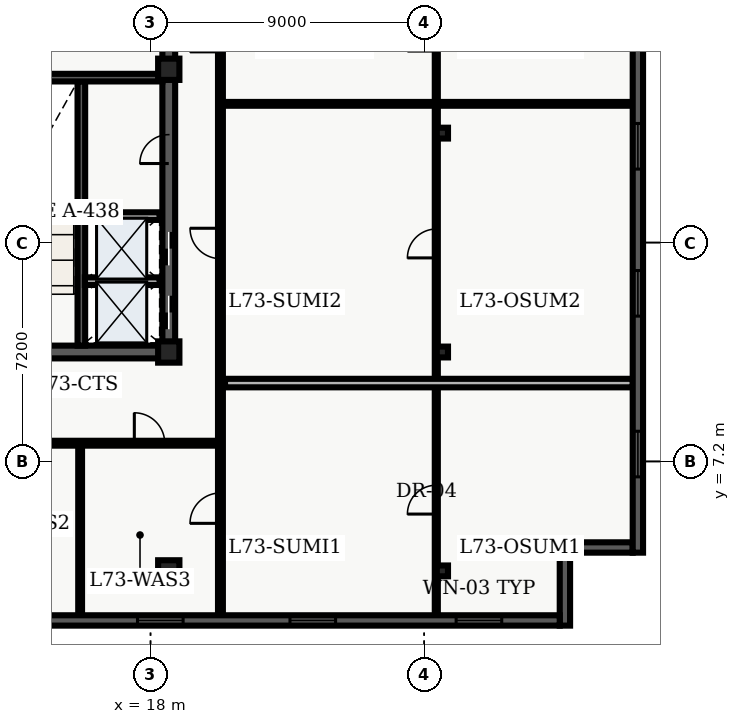
"""IFC4 building model, lengths in metres.
Left out: names, types, materials, properties, quantities, classifications, styles, units other than length and angle.
Written with IfcOpenShell. Run it as: python <this file> out.ifc"""

import sys

from ifc_helpers import new_model, entity, si_unit, converted_unit, direction, frame, origin_with_axes, origin_2d_with_axis, place, context, subcontext, project, spatial, polyline, rectangle, i_section, outline, extrude, element, fill, save


model = new_model("IFC4")
c1 = context("Model", 3, precision=1e-05, world=origin_with_axes(), true_north=direction((0.0, 1.0)))
c2 = subcontext(c1, "Body", "Model", "MODEL_VIEW")
j1 = project(units=[si_unit("LENGTHUNIT", "METRE"), converted_unit("PLANEANGLEUNIT", "DEGREE", entity("IfcPlaneAngleMeasure", 0.017), si_unit("PLANEANGLEUNIT", "RADIAN"), dimensions=[0, 0, 0, 0, 0, 0, 0])], contexts=[c1])
p1 = place(None, origin_with_axes())
s1 = spatial("IfcSite", under=j1, at=p1, CompositionType="ELEMENT")
p2 = place(p1, origin_with_axes())
s2 = spatial("IfcBuilding", under=s1, at=p2, CompositionType="ELEMENT")
p3 = place(p2, frame((0.0, 0.0, 295.8), z_axis=(0.0, 0.0, 1.0), x_axis=(1.0, 0.0, 0.0)))
s3 = spatial("IfcBuildingStorey", under=s2, at=p3, CompositionType="ELEMENT", Elevation=295.8)
p4 = place(p3, frame((11.4, 10.8, 0.0), z_axis=(0.0, 0.0, 1.0), x_axis=(1.0, 0.0, 0.0)))
e1 = element("IfcWall", 1, at=p4, inside=s3, PredefinedType="SHEAR", context=c2, shape_type="SweptSolid", body=[
    extrude(outline(polyline([(0.0, -0.21), (7.2, -0.21), (7.2, 0.21), (0.0, 0.21), (0.0, -0.21)])), origin_with_axes(), (0.0, 0.0, 1.0), 3.66),
])
p5 = place(p4, frame((2.625, 0.0, 0.0), z_axis=(0.0, 0.0, 1.0), x_axis=(1.0, 0.0, 0.0)))
e2 = element("IfcOpeningElement", 2, at=p5, cuts=e1, PredefinedType="OPENING", context=c2, shape_type="SweptSolid", body=[
    extrude(rectangle(XDim=1.05, YDim=0.44, at=origin_2d_with_axis()), origin_with_axes(), (0.0, 0.0, 1.0), 2.15),
])
p6 = place(p3, frame((18.6, 10.8, 0.0), z_axis=(0.0, 0.0, 1.0), x_axis=(0.0, 1.0, 0.0)))
e3 = element("IfcWall", 3, at=p6, inside=s3, PredefinedType="SHEAR", context=c2, shape_type="SweptSolid", body=[
    extrude(outline(polyline([(0.0, -0.21), (13.5, -0.21), (13.5, 0.21), (0.0, 0.21), (0.0, -0.21)])), origin_with_axes(), (0.0, 0.0, 1.0), 3.66),
])
p7 = place(p6, frame((1.3, 0.0, 0.0), z_axis=(0.0, 0.0, 1.0), x_axis=(1.0, 0.0, 0.0)))
e4 = element("IfcOpeningElement", 4, at=p7, cuts=e3, PredefinedType="OPENING", context=c2, shape_type="SweptSolid", body=[
    extrude(rectangle(XDim=1.1, YDim=0.44, at=origin_2d_with_axis()), origin_with_axes(), (0.0, 0.0, 1.0), 2.15),
])
p8 = place(p6, frame((3.4, 0.0, 0.0), z_axis=(0.0, 0.0, 1.0), x_axis=(1.0, 0.0, 0.0)))
e5 = element("IfcOpeningElement", 5, at=p8, cuts=e3, PredefinedType="OPENING", context=c2, shape_type="SweptSolid", body=[
    extrude(rectangle(XDim=1.1, YDim=0.44, at=origin_2d_with_axis()), origin_with_axes(), (0.0, 0.0, 1.0), 2.15),
])
p9 = place(p6, frame((11.125, 0.0, 0.0), z_axis=(0.0, 0.0, 1.0), x_axis=(1.0, 0.0, 0.0)))
e6 = element("IfcOpeningElement", 6, at=p9, cuts=e3, PredefinedType="OPENING", context=c2, shape_type="SweptSolid", body=[
    extrude(rectangle(XDim=1.05, YDim=0.44, at=origin_2d_with_axis()), origin_with_axes(), (0.0, 0.0, 1.0), 2.15),
])
p10 = place(p6, frame((6.675, 0.0, 0.0), z_axis=(0.0, 0.0, 1.0), x_axis=(1.0, 0.0, 0.0)))
e7 = element("IfcOpeningElement", 7, at=p10, cuts=e3, PredefinedType="OPENING", context=c2, shape_type="SweptSolid", body=[
    extrude(rectangle(XDim=0.95, YDim=0.44, at=origin_2d_with_axis()), origin_with_axes(), (0.0, 0.0, 1.0), 2.15),
])
p11 = place(p3, frame((15.725, 11.01, 0.0), z_axis=(0.0, 0.0, 1.0), x_axis=(0.0, 1.0, 0.0)))
e8 = element("IfcWall", 8, at=p11, inside=s3, PredefinedType="SHEAR", context=c2, shape_type="SweptSolid", body=[
    extrude(outline(polyline([(0.0, -0.125), (8.69, -0.125), (8.69, 0.125), (0.0, 0.125), (0.0, -0.125)])), origin_with_axes(), (0.0, 0.0, 1.0), 3.66),
])
p12 = place(p3, frame((11.61, 19.825, 0.0), z_axis=(0.0, 0.0, 1.0), x_axis=(1.0, 0.0, 0.0)))
e9 = element("IfcWall", 9, at=p12, inside=s3, PredefinedType="SHEAR", context=c2, shape_type="SweptSolid", body=[
    extrude(outline(polyline([(0.0, -0.125), (6.78, -0.125), (6.78, 0.125), (0.0, 0.125), (0.0, -0.125)])), origin_with_axes(), (0.0, 0.0, 1.0), 3.66),
])
for number, where, z_axis, x_axis in (
    (10, (18.6, 3.6, 0.0), (0.0, 0.0, 1.0), (1.0, 0.0, 0.0)),
    (11, (18.6, 10.8, 0.0), (0.0, 0.0, 1.0), (1.0, 0.0, 0.0)),
    (12, (18.6, 20.1, 0.0), (0.0, 0.0, 1.0), (1.0, 0.0, 0.0)),
):
    element("IfcColumn", number, at=place(p3, frame(where, z_axis=z_axis, x_axis=x_axis)), inside=s3, PredefinedType="COLUMN", context=c2, shape_type="SweptSolid", body=[
        extrude(rectangle(XDim=0.7, YDim=0.7, at=origin_2d_with_axis()), origin_with_axes(), (0.0, 0.0, 1.0), 3.9),
    ])
for number, where, z_axis, x_axis in (
    (13, (27.6, 3.6, 0.0), (0.0, 0.0, 1.0), (1.0, 0.0, 0.0)),
    (14, (27.6, 10.8, 0.0), (0.0, 0.0, 1.0), (1.0, 0.0, 0.0)),
    (15, (27.6, 18.0, 0.0), (0.0, 0.0, 1.0), (1.0, 0.0, 0.0)),
):
    element("IfcColumn", number, at=place(p3, frame(where, z_axis=z_axis, x_axis=x_axis)), inside=s3, PredefinedType="COLUMN", context=c2, shape_type="SweptSolid", body=[
        extrude(i_section(OverallWidth=0.369, OverallDepth=0.356, WebThickness=0.011, FlangeThickness=0.018, FilletRadius=0.018, at=origin_2d_with_axis()), origin_with_axes(), (0.0, 0.0, 1.0), 3.9),
    ])
for number, where, z_axis, x_axis in (
    (16, (15.84, 13.13, 0.0), (0.0, 0.0, 1.0), (1.0, 0.0, 0.0)),
    (17, (15.84, 15.27, 0.0), (0.0, 0.0, 1.0), (1.0, 0.0, 0.0)),
):
    element("IfcWall", number, at=place(p3, frame(where, z_axis=z_axis, x_axis=x_axis)), inside=s3, PredefinedType="SOLIDWALL", context=c2, shape_type="SweptSolid", body=[
        extrude(outline(polyline([(0.0, -0.125), (2.46, -0.125), (2.46, 0.125), (0.0, 0.125), (0.0, -0.125)])), origin_with_axes(), (0.0, 0.0, 1.0), 2.7),
    ])
p13 = place(p3, frame((8.135, 7.8, 0.0), z_axis=(0.0, 0.0, 1.0), x_axis=(1.0, 0.0, 0.0)))
e18 = element("IfcWall", 18, at=p13, inside=s3, PredefinedType="PARTITIONING", context=c2, shape_type="SweptSolid", body=[
    extrude(outline(polyline([(0.0, -0.08), (12.165, -0.08), (12.165, 0.08), (0.0, 0.08), (0.0, -0.08)])), origin_with_axes(), (0.0, 0.0, 1.0), 2.7),
])
p14 = place(p13, frame((0.908, 0.0, 0.0), z_axis=(0.0, 0.0, 1.0), x_axis=(1.0, 0.0, 0.0)))
e19 = element("IfcOpeningElement", 19, at=p14, cuts=e18, PredefinedType="OPENING", context=c2, shape_type="SweptSolid", body=[
    extrude(rectangle(XDim=1.0, YDim=0.18, at=origin_2d_with_axis()), origin_with_axes(), (0.0, 0.0, 1.0), 2.15),
])
p15 = place(p13, frame((5.556, 0.0, 0.0), z_axis=(0.0, 0.0, 1.0), x_axis=(1.0, 0.0, 0.0)))
e20 = element("IfcOpeningElement", 20, at=p15, cuts=e18, PredefinedType="OPENING", context=c2, shape_type="SweptSolid", body=[
    extrude(rectangle(XDim=1.0, YDim=0.18, at=origin_2d_with_axis()), origin_with_axes(), (0.0, 0.0, 1.0), 2.15),
])
p16 = place(p13, frame((9.832, 0.0, 0.0), z_axis=(0.0, 0.0, 1.0), x_axis=(1.0, 0.0, 0.0)))
e21 = element("IfcOpeningElement", 21, at=p16, cuts=e18, PredefinedType="OPENING", context=c2, shape_type="SweptSolid", body=[
    extrude(rectangle(XDim=1.0, YDim=0.18, at=origin_2d_with_axis()), origin_with_axes(), (0.0, 0.0, 1.0), 2.15),
])
p17 = place(p3, frame((20.3, 2.14, 0.0), z_axis=(0.0, 0.0, 1.0), x_axis=(0.0, 1.0, 0.0)))
e22 = element("IfcWall", 22, at=p17, inside=s3, PredefinedType="PARTITIONING", context=c2, shape_type="SweptSolid", body=[
    extrude(outline(polyline([(0.0, -0.08), (38.36, -0.08), (38.36, 0.08), (0.0, 0.08), (0.0, -0.08)])), origin_with_axes(), (0.0, 0.0, 1.0), 2.7),
])
p18 = place(p17, frame((30.685, 0.0, 0.0), z_axis=(0.0, 0.0, 1.0), x_axis=(1.0, 0.0, 0.0)))
e23 = element("IfcOpeningElement", 23, at=p18, cuts=e22, PredefinedType="OPENING", context=c2, shape_type="SweptSolid", body=[
    extrude(rectangle(XDim=1.05, YDim=0.18, at=origin_2d_with_axis()), origin_with_axes(), (0.0, 0.0, 1.0), 2.15),
])
p19 = place(p17, frame((3.524, 0.0, 0.0), z_axis=(0.0, 0.0, 1.0), x_axis=(1.0, 0.0, 0.0)))
e24 = element("IfcOpeningElement", 24, at=p19, cuts=e22, PredefinedType="OPENING", context=c2, shape_type="SweptSolid", body=[
    extrude(rectangle(XDim=1.0, YDim=0.18, at=origin_2d_with_axis()), origin_with_axes(), (0.0, 0.0, 1.0), 2.15),
])
p20 = place(p17, frame((12.23, 0.0, 0.0), z_axis=(0.0, 0.0, 1.0), x_axis=(1.0, 0.0, 0.0)))
e25 = element("IfcOpeningElement", 25, at=p20, cuts=e22, PredefinedType="OPENING", context=c2, shape_type="SweptSolid", body=[
    extrude(rectangle(XDim=1.0, YDim=0.18, at=origin_2d_with_axis()), origin_with_axes(), (0.0, 0.0, 1.0), 2.15),
])
p21 = place(p17, frame((19.033, 0.0, 0.0), z_axis=(0.0, 0.0, 1.0), x_axis=(1.0, 0.0, 0.0)))
e26 = element("IfcOpeningElement", 26, at=p21, cuts=e22, PredefinedType="OPENING", context=c2, shape_type="SweptSolid", body=[
    extrude(rectangle(XDim=1.0, YDim=0.18, at=origin_2d_with_axis()), origin_with_axes(), (0.0, 0.0, 1.0), 2.15),
])
p22 = place(p17, frame((23.912, 0.0, 0.0), z_axis=(0.0, 0.0, 1.0), x_axis=(1.0, 0.0, 0.0)))
e27 = element("IfcOpeningElement", 27, at=p22, cuts=e22, PredefinedType="OPENING", context=c2, shape_type="SweptSolid", body=[
    extrude(rectangle(XDim=1.0, YDim=0.18, at=origin_2d_with_axis()), origin_with_axes(), (0.0, 0.0, 1.0), 2.15),
])
p23 = place(p3, frame((15.685, 2.135, 0.0), z_axis=(0.0, 0.0, 1.0), x_axis=(0.0, 1.0, 0.0)))
e28 = element("IfcWall", 28, at=p23, inside=s3, PredefinedType="PARTITIONING", context=c2, shape_type="SweptSolid", body=[
    extrude(outline(polyline([(0.0, -0.062), (5.565, -0.062), (5.565, 0.062), (0.0, 0.062), (0.0, -0.062)])), origin_with_axes(), (0.0, 0.0, 1.0), 2.7),
])
p24 = place(p3, frame((27.4, 2.135, 0.0), z_axis=(0.0, 0.0, 1.0), x_axis=(0.0, 1.0, 0.0)))
e29 = element("IfcWall", 29, at=p24, inside=s3, PredefinedType="PARTITIONING", context=c2, shape_type="SweptSolid", body=[
    extrude(outline(polyline([(0.0, -0.05), (26.515, -0.05), (26.515, 0.05), (0.0, 0.05), (0.0, -0.05)])), origin_with_axes(), (0.0, 0.0, 1.0), 2.7),
])
p25 = place(p24, frame((3.809, 0.0, 0.0), z_axis=(0.0, 0.0, 1.0), x_axis=(1.0, 0.0, 0.0)))
e30 = element("IfcOpeningElement", 30, at=p25, cuts=e29, PredefinedType="OPENING", context=c2, shape_type="SweptSolid", body=[
    extrude(rectangle(XDim=0.95, YDim=0.12, at=origin_2d_with_axis()), origin_with_axes(), (0.0, 0.0, 1.0), 2.15),
])
p26 = place(p24, frame((12.236, 0.0, 0.0), z_axis=(0.0, 0.0, 1.0), x_axis=(1.0, 0.0, 0.0)))
e31 = element("IfcOpeningElement", 31, at=p26, cuts=e29, PredefinedType="OPENING", context=c2, shape_type="SweptSolid", body=[
    extrude(rectangle(XDim=0.95, YDim=0.12, at=origin_2d_with_axis()), origin_with_axes(), (0.0, 0.0, 1.0), 2.15),
])
p27 = place(p24, frame((19.038, 0.0, 0.0), z_axis=(0.0, 0.0, 1.0), x_axis=(1.0, 0.0, 0.0)))
e32 = element("IfcOpeningElement", 32, at=p27, cuts=e29, PredefinedType="OPENING", context=c2, shape_type="SweptSolid", body=[
    extrude(rectangle(XDim=0.95, YDim=0.12, at=origin_2d_with_axis()), origin_with_axes(), (0.0, 0.0, 1.0), 2.15),
])
p28 = place(p24, frame((23.916, 0.0, 0.0), z_axis=(0.0, 0.0, 1.0), x_axis=(1.0, 0.0, 0.0)))
e33 = element("IfcOpeningElement", 33, at=p28, cuts=e29, PredefinedType="OPENING", context=c2, shape_type="SweptSolid", body=[
    extrude(rectangle(XDim=0.95, YDim=0.12, at=origin_2d_with_axis()), origin_with_axes(), (0.0, 0.0, 1.0), 2.15),
])
p29 = place(p3, frame((20.45, 9.778, 0.0), z_axis=(0.0, 0.0, 1.0), x_axis=(1.0, 0.0, 0.0)))
e34 = element("IfcWall", 34, at=p29, inside=s3, PredefinedType="PARTITIONING", context=c2, shape_type="SweptSolid", body=[
    extrude(outline(polyline([(0.0, -0.14), (13.415, -0.14), (13.415, 0.14), (0.0, 0.14), (0.0, -0.14)])), origin_with_axes(), (0.0, 0.0, 1.0), 2.7),
])
p30 = place(p3, frame((20.45, 18.963, 0.0), z_axis=(0.0, 0.0, 1.0), x_axis=(1.0, 0.0, 0.0)))
e35 = element("IfcWall", 35, at=p30, inside=s3, PredefinedType="PARTITIONING", context=c2, shape_type="SweptSolid", body=[
    extrude(outline(polyline([(0.0, -0.062), (13.415, -0.062), (13.415, 0.062), (0.0, 0.062), (0.0, -0.062)])), origin_with_axes(), (0.0, 0.0, 1.0), 2.7),
])
p31 = place(p3, frame((33.86, 4.37, 0.0), z_axis=(0.0, 0.0, 1.0), x_axis=(-1.0, 0.0, 0.0)))
e36 = element("IfcWall", 36, at=p31, inside=s3, PredefinedType="SOLIDWALL", context=c2, shape_type="SweptSolid", body=[
    extrude(outline(polyline([(0.0, -0.17), (2.06, -0.17), (2.06, 0.17), (0.0, 0.17), (0.0, -0.17)])), origin_with_axes(), (0.0, 0.0, 1.0), 3.66),
])
p32 = place(p3, frame((31.63, 4.54, 0.0), z_axis=(0.0, 0.0, 1.0), x_axis=(0.0, -1.0, 0.0)))
e37 = element("IfcWall", 37, at=p32, inside=s3, PredefinedType="SOLIDWALL", context=c2, shape_type="SweptSolid", body=[
    extrude(outline(polyline([(0.0, -0.17), (2.74, -0.17), (2.74, 0.17), (0.0, 0.17), (0.0, -0.17)])), origin_with_axes(), (0.0, 0.0, 1.0), 3.66),
])
p33 = place(p3, frame((31.46, 1.97, 0.0), z_axis=(0.0, 0.0, 1.0), x_axis=(-1.0, 0.0, 0.0)))
e38 = element("IfcWall", 38, at=p33, inside=s3, PredefinedType="SOLIDWALL", context=c2, shape_type="SweptSolid", body=[
    extrude(outline(polyline([(0.0, -0.17), (21.26, -0.17), (21.26, 0.17), (0.0, 0.17), (0.0, -0.17)])), origin_with_axes(), (0.0, 0.0, 1.0), 3.66),
])
p34 = place(p33, frame((2.658, 0.0, 0.45), z_axis=(0.0, 0.0, 1.0), x_axis=(1.0, 0.0, 0.0)))
e39 = element("IfcOpeningElement", 39, at=p34, cuts=e38, PredefinedType="OPENING", context=c2, shape_type="SweptSolid", body=[
    extrude(rectangle(XDim=1.5, YDim=0.36, at=origin_2d_with_axis()), origin_with_axes(), (0.0, 0.0, 1.0), 2.1),
])
p35 = place(p33, frame((8.123, 0.0, 0.45), z_axis=(0.0, 0.0, 1.0), x_axis=(1.0, 0.0, 0.0)))
e40 = element("IfcOpeningElement", 40, at=p35, cuts=e38, PredefinedType="OPENING", context=c2, shape_type="SweptSolid", body=[
    extrude(rectangle(XDim=1.5, YDim=0.36, at=origin_2d_with_axis()), origin_with_axes(), (0.0, 0.0, 1.0), 2.1),
])
p36 = place(p33, frame((13.138, 0.0, 0.45), z_axis=(0.0, 0.0, 1.0), x_axis=(1.0, 0.0, 0.0)))
e41 = element("IfcOpeningElement", 41, at=p36, cuts=e38, PredefinedType="OPENING", context=c2, shape_type="SweptSolid", body=[
    extrude(rectangle(XDim=1.5, YDim=0.36, at=origin_2d_with_axis()), origin_with_axes(), (0.0, 0.0, 1.0), 2.1),
])
p37 = place(p33, frame((18.153, 0.0, 0.45), z_axis=(0.0, 0.0, 1.0), x_axis=(1.0, 0.0, 0.0)))
e42 = element("IfcOpeningElement", 42, at=p37, cuts=e38, PredefinedType="OPENING", context=c2, shape_type="SweptSolid", body=[
    extrude(rectangle(XDim=1.5, YDim=0.36, at=origin_2d_with_axis()), origin_with_axes(), (0.0, 0.0, 1.0), 2.1),
])
p38 = place(p3, frame((34.03, 21.26, 0.0), z_axis=(0.0, 0.0, 1.0), x_axis=(0.0, -1.0, 0.0)))
e43 = element("IfcWall", 43, at=p38, inside=s3, PredefinedType="SOLIDWALL", context=c2, shape_type="SweptSolid", body=[
    extrude(outline(polyline([(0.0, -0.17), (17.06, -0.17), (17.06, 0.17), (0.0, 0.17), (0.0, -0.17)])), origin_with_axes(), (0.0, 0.0, 1.0), 3.66),
])
p39 = place(p38, frame((3.693, 0.0, 0.45), z_axis=(0.0, 0.0, 1.0), x_axis=(1.0, 0.0, 0.0)))
e44 = element("IfcOpeningElement", 44, at=p39, cuts=e43, PredefinedType="OPENING", context=c2, shape_type="SweptSolid", body=[
    extrude(rectangle(XDim=1.5, YDim=0.36, at=origin_2d_with_axis()), origin_with_axes(), (0.0, 0.0, 1.0), 2.1),
])
p40 = place(p38, frame((8.53, 0.0, 0.45), z_axis=(0.0, 0.0, 1.0), x_axis=(1.0, 0.0, 0.0)))
e45 = element("IfcOpeningElement", 45, at=p40, cuts=e43, PredefinedType="OPENING", context=c2, shape_type="SweptSolid", body=[
    extrude(rectangle(XDim=1.5, YDim=0.36, at=origin_2d_with_axis()), origin_with_axes(), (0.0, 0.0, 1.0), 2.1),
])
p41 = place(p38, frame((13.817, 0.0, 0.45), z_axis=(0.0, 0.0, 1.0), x_axis=(1.0, 0.0, 0.0)))
e46 = element("IfcOpeningElement", 46, at=p41, cuts=e43, PredefinedType="OPENING", context=c2, shape_type="SweptSolid", body=[
    extrude(rectangle(XDim=1.5, YDim=0.36, at=origin_2d_with_axis()), origin_with_axes(), (0.0, 0.0, 1.0), 2.1),
])
p42 = place(p6, frame((1.3, 0.0, 0.0), z_axis=(0.0, 0.0, 1.0), x_axis=(1.0, 0.0, 0.0)))
e47 = element("IfcDoor", 47, at=p42, inside=s3, OperationType="SLIDING_TO_LEFT", PredefinedType="DOOR", context=c2, shape_type="SweptSolid", body=[
    extrude(rectangle(XDim=1.1, YDim=0.09, at=origin_2d_with_axis()), origin_with_axes(), (0.0, 0.0, 1.0), 2.15),
])
fill(e4, e47)
p43 = place(p6, frame((3.4, 0.0, 0.0), z_axis=(0.0, 0.0, 1.0), x_axis=(1.0, 0.0, 0.0)))
e48 = element("IfcDoor", 48, at=p43, inside=s3, OperationType="SLIDING_TO_RIGHT", PredefinedType="DOOR", context=c2, shape_type="SweptSolid", body=[
    extrude(rectangle(XDim=1.1, YDim=0.09, at=origin_2d_with_axis()), origin_with_axes(), (0.0, 0.0, 1.0), 2.15),
])
fill(e5, e48)
p44 = place(p6, frame((6.675, 0.0, 0.0), z_axis=(0.0, 0.0, 1.0), x_axis=(1.0, 0.0, 0.0)))
e49 = element("IfcDoor", 49, at=p44, inside=s3, OperationType="SINGLE_SWING_LEFT", PredefinedType="DOOR", context=c2, shape_type="SweptSolid", body=[
    extrude(rectangle(XDim=0.95, YDim=0.09, at=origin_2d_with_axis()), origin_with_axes(), (0.0, 0.0, 1.0), 2.15),
])
fill(e7, e49)
p45 = place(p13, frame((9.832, 0.0, 0.0), z_axis=(0.0, 0.0, 1.0), x_axis=(1.0, 0.0, 0.0)))
e50 = element("IfcDoor", 50, at=p45, inside=s3, OperationType="SINGLE_SWING_LEFT", PredefinedType="DOOR", context=c2, shape_type="SweptSolid", body=[
    extrude(rectangle(XDim=1.0, YDim=0.09, at=origin_2d_with_axis()), origin_with_axes(), (0.0, 0.0, 1.0), 2.15),
])
fill(e21, e50)
p46 = place(p24, frame((3.809, 0.0, 0.0), z_axis=(0.0, 0.0, 1.0), x_axis=(1.0, 0.0, 0.0)))
e51 = element("IfcDoor", 51, at=p46, inside=s3, OperationType="SINGLE_SWING_LEFT", PredefinedType="DOOR", context=c2, shape_type="SweptSolid", body=[
    extrude(rectangle(XDim=0.95, YDim=0.06, at=origin_2d_with_axis()), origin_with_axes(), (0.0, 0.0, 1.0), 2.15),
])
fill(e30, e51)
p47 = place(p17, frame((3.524, 0.0, 0.0), z_axis=(0.0, 0.0, 1.0), x_axis=(1.0, 0.0, 0.0)))
e52 = element("IfcDoor", 52, at=p47, inside=s3, OperationType="SINGLE_SWING_LEFT", PredefinedType="DOOR", context=c2, shape_type="SweptSolid", body=[
    extrude(rectangle(XDim=1.0, YDim=0.09, at=origin_2d_with_axis()), origin_with_axes(), (0.0, 0.0, 1.0), 2.15),
])
fill(e24, e52)
p48 = place(p24, frame((12.236, 0.0, 0.0), z_axis=(0.0, 0.0, 1.0), x_axis=(1.0, 0.0, 0.0)))
e53 = element("IfcDoor", 53, at=p48, inside=s3, OperationType="SINGLE_SWING_LEFT", PredefinedType="DOOR", context=c2, shape_type="SweptSolid", body=[
    extrude(rectangle(XDim=0.95, YDim=0.06, at=origin_2d_with_axis()), origin_with_axes(), (0.0, 0.0, 1.0), 2.15),
])
fill(e31, e53)
p49 = place(p17, frame((12.23, 0.0, 0.0), z_axis=(0.0, 0.0, 1.0), x_axis=(1.0, 0.0, 0.0)))
e54 = element("IfcDoor", 54, at=p49, inside=s3, OperationType="SINGLE_SWING_RIGHT", PredefinedType="DOOR", context=c2, shape_type="SweptSolid", body=[
    extrude(rectangle(XDim=1.0, YDim=0.09, at=origin_2d_with_axis()), origin_with_axes(), (0.0, 0.0, 1.0), 2.15),
])
fill(e25, e54)
p50 = place(p17, frame((19.033, 0.0, 0.0), z_axis=(0.0, 0.0, 1.0), x_axis=(1.0, 0.0, 0.0)))
e55 = element("IfcDoor", 55, at=p50, inside=s3, OperationType="SINGLE_SWING_LEFT", PredefinedType="DOOR", context=c2, shape_type="SweptSolid", body=[
    extrude(rectangle(XDim=1.0, YDim=0.09, at=origin_2d_with_axis()), origin_with_axes(), (0.0, 0.0, 1.0), 2.15),
])
fill(e26, e55)
p51 = place(p33, frame((2.658, 0.0, 0.45), z_axis=(0.0, 0.0, 1.0), x_axis=(1.0, 0.0, 0.0)))
e56 = element("IfcWindow", 56, at=p51, inside=s3, PredefinedType="WINDOW", context=c2, shape_type="SweptSolid", body=[
    extrude(rectangle(XDim=1.5, YDim=0.09, at=origin_2d_with_axis()), origin_with_axes(), (0.0, 0.0, 1.0), 2.1),
])
fill(e39, e56)
p52 = place(p33, frame((8.123, 0.0, 0.45), z_axis=(0.0, 0.0, 1.0), x_axis=(1.0, 0.0, 0.0)))
e57 = element("IfcWindow", 57, at=p52, inside=s3, PredefinedType="WINDOW", context=c2, shape_type="SweptSolid", body=[
    extrude(rectangle(XDim=1.5, YDim=0.09, at=origin_2d_with_axis()), origin_with_axes(), (0.0, 0.0, 1.0), 2.1),
])
fill(e40, e57)
p53 = place(p33, frame((13.138, 0.0, 0.45), z_axis=(0.0, 0.0, 1.0), x_axis=(1.0, 0.0, 0.0)))
e58 = element("IfcWindow", 58, at=p53, inside=s3, PredefinedType="WINDOW", context=c2, shape_type="SweptSolid", body=[
    extrude(rectangle(XDim=1.5, YDim=0.09, at=origin_2d_with_axis()), origin_with_axes(), (0.0, 0.0, 1.0), 2.1),
])
fill(e41, e58)
p54 = place(p38, frame((3.693, 0.0, 0.45), z_axis=(0.0, 0.0, 1.0), x_axis=(1.0, 0.0, 0.0)))
e59 = element("IfcWindow", 59, at=p54, inside=s3, PredefinedType="WINDOW", context=c2, shape_type="SweptSolid", body=[
    extrude(rectangle(XDim=1.5, YDim=0.09, at=origin_2d_with_axis()), origin_with_axes(), (0.0, 0.0, 1.0), 2.1),
])
fill(e44, e59)
p55 = place(p38, frame((8.53, 0.0, 0.45), z_axis=(0.0, 0.0, 1.0), x_axis=(1.0, 0.0, 0.0)))
e60 = element("IfcWindow", 60, at=p55, inside=s3, PredefinedType="WINDOW", context=c2, shape_type="SweptSolid", body=[
    extrude(rectangle(XDim=1.5, YDim=0.09, at=origin_2d_with_axis()), origin_with_axes(), (0.0, 0.0, 1.0), 2.1),
])
fill(e45, e60)
p56 = place(p38, frame((13.817, 0.0, 0.45), z_axis=(0.0, 0.0, 1.0), x_axis=(1.0, 0.0, 0.0)))
e61 = element("IfcWindow", 61, at=p56, inside=s3, PredefinedType="WINDOW", context=c2, shape_type="SweptSolid", body=[
    extrude(rectangle(XDim=1.5, YDim=0.09, at=origin_2d_with_axis()), origin_with_axes(), (0.0, 0.0, 1.0), 2.1),
])
fill(e46, e61)
save(model, sys.argv[1])
